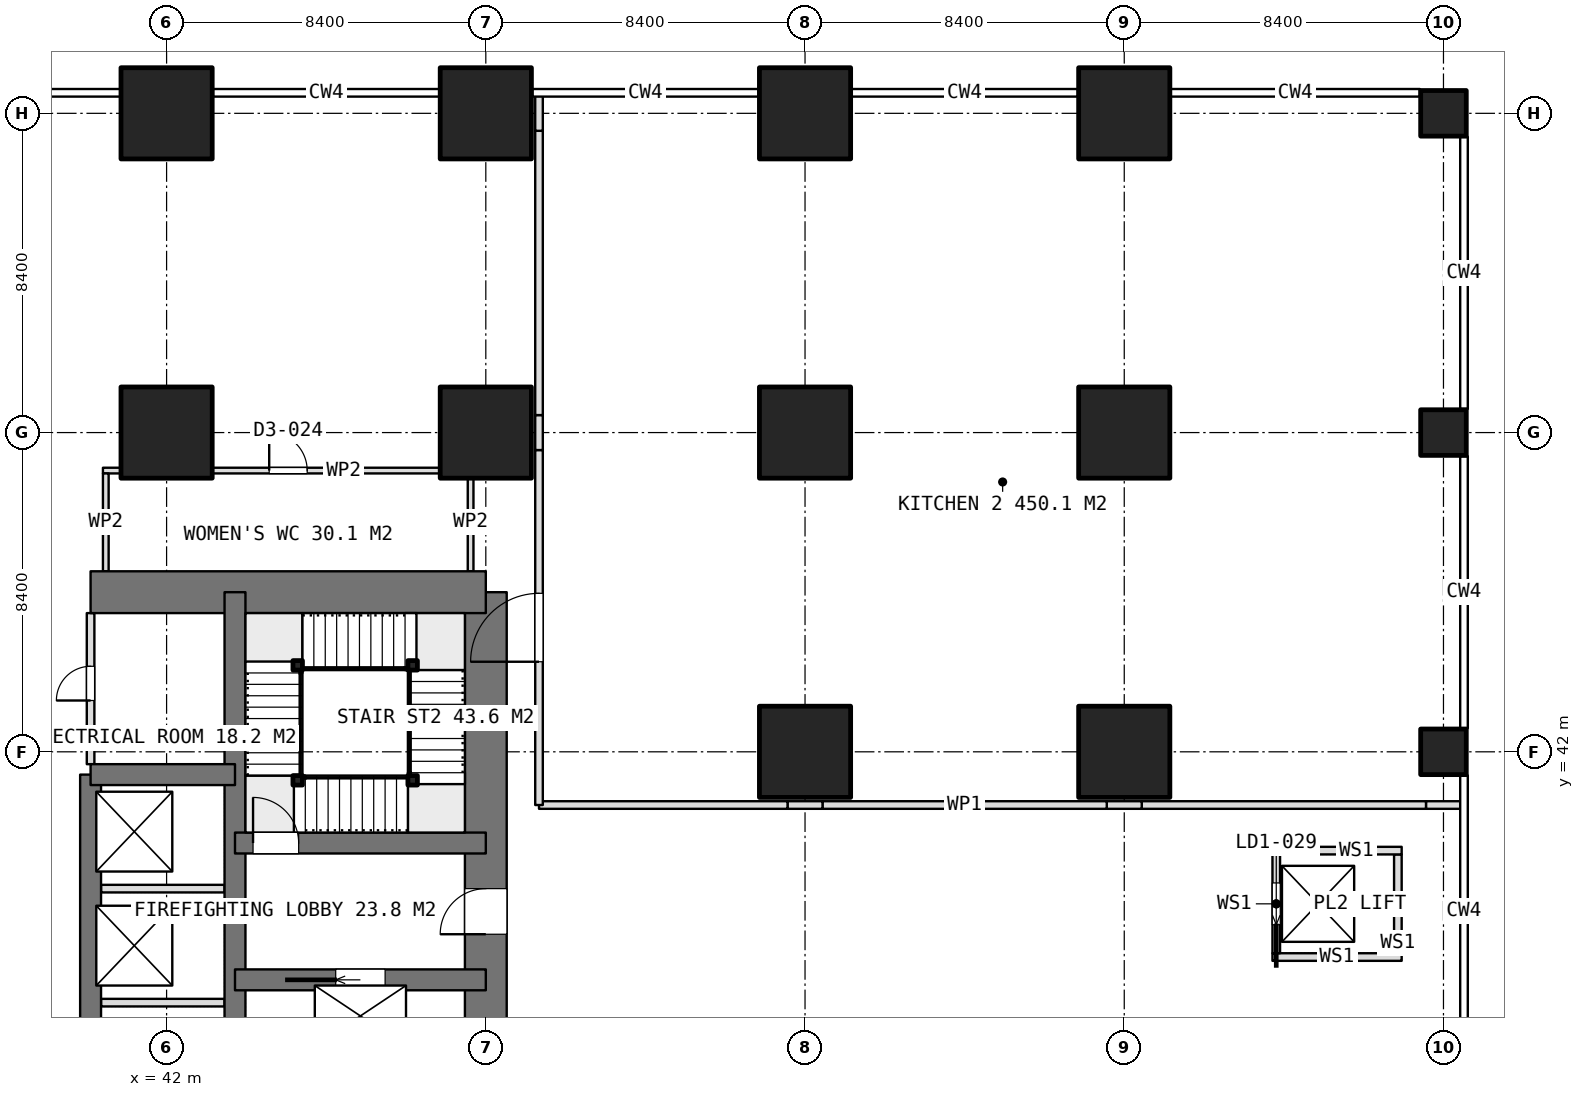
"""IFC4 building model, lengths in metres.
Left out: names, types, materials, properties, quantities, classifications, styles, units other than length and angle.
Written with IfcOpenShell. Run it as: python <this file> out.ifc"""

import sys

from ifc_helpers import new_model, si_unit, direction, frame, frame_2d, origin, origin_2d, place, context, subcontext, project, spatial, rectangle, extrude, element, fill, save


model = new_model("IFC4")
c1 = context("Model", 3, precision=1e-05, world=origin(), true_north=direction((0.0, 1.0)))
c2 = subcontext(c1, "Body", "Model", "MODEL_VIEW")
j1 = project(units=[si_unit("LENGTHUNIT", "METRE"), si_unit("PLANEANGLEUNIT", "RADIAN")], contexts=[c1])
p1 = place(None, origin())
s1 = spatial("IfcSite", under=j1, at=p1, CompositionType="ELEMENT")
p2 = place(p1, origin())
s2 = spatial("IfcBuilding", under=s1, at=p2, CompositionType="ELEMENT")
p3 = place(p2, frame((0.0, 0.0, 15.4)))
s3 = spatial("IfcBuildingStorey", under=s2, at=p3, CompositionType="ELEMENT", Elevation=15.4)
p4 = place(p3, frame((40.0, 46.2, 0.0), z_axis=(0.0, 0.0, 1.0), x_axis=(1.0, 0.0, 0.0)))
e1 = element("IfcWall", 1, at=p4, inside=s3, PredefinedType="SHEAR", context=c2, shape_type="SweptSolid", body=[
    extrude(rectangle(XDim=10.4, YDim=1.1, at=frame_2d((5.2, 0.0))), origin(), (0.0, 0.0, 1.0), 5.0),
])
p5 = place(p3, frame((50.4, 21.0, 0.0), z_axis=(0.0, 0.0, 1.0), x_axis=(0.0, 1.0, 0.0)))
e2 = element("IfcWall", 2, at=p5, inside=s3, PredefinedType="SHEAR", context=c2, shape_type="SweptSolid", body=[
    extrude(rectangle(XDim=25.2, YDim=1.1, at=frame_2d((12.6, 0.0))), origin(), (0.0, 0.0, 1.0), 5.0),
])
p6 = place(p5, frame((16.2, 0.0, 0.0)))
e3 = element("IfcOpeningElement", 3, at=p6, cuts=e2, PredefinedType="OPENING", context=c2, shape_type="SweptSolid", body=[
    extrude(rectangle(XDim=1.2, YDim=2.1, at=frame_2d((0.6, 1.05))), frame((0.0, 0.56, 0.0), z_axis=(0.0, -1.0, 0.0), x_axis=(1.0, 0.0, 0.0)), (0.0, 0.0, 1.0), 1.12),
])
p7 = place(p5, frame((10.05, 0.0, 0.0)))
e4 = element("IfcOpeningElement", 4, at=p7, cuts=e2, PredefinedType="OPENING", context=c2, shape_type="SweptSolid", body=[
    extrude(rectangle(XDim=0.9, YDim=2.1, at=frame_2d((0.45, 1.05))), frame((0.0, 0.56, 0.0), z_axis=(0.0, -1.0, 0.0), x_axis=(1.0, 0.0, 0.0)), (0.0, 0.0, 1.0), 1.12),
])
p8 = place(p5, frame((7.45, 0.0, 0.0)))
e5 = element("IfcOpeningElement", 5, at=p8, cuts=e2, PredefinedType="OPENING", context=c2, shape_type="SweptSolid", body=[
    extrude(rectangle(XDim=0.9, YDim=2.1, at=frame_2d((0.45, 1.05))), frame((0.0, 0.56, 0.0), z_axis=(0.0, -1.0, 0.0), x_axis=(1.0, 0.0, 0.0)), (0.0, 0.0, 1.0), 1.12),
])
p9 = place(p5, frame((0.75, 0.0, 0.0)))
e6 = element("IfcOpeningElement", 6, at=p9, cuts=e2, PredefinedType="OPENING", context=c2, shape_type="SweptSolid", body=[
    extrude(rectangle(XDim=1.2, YDim=2.1, at=frame_2d((0.6, 1.05))), frame((0.0, 0.56, 0.0), z_axis=(0.0, -1.0, 0.0), x_axis=(1.0, 0.0, 0.0)), (0.0, 0.0, 1.0), 1.12),
])
p10 = place(p3, frame((43.8, 21.0, 0.0), z_axis=(0.0, 0.0, 1.0), x_axis=(0.0, 1.0, 0.0)))
e7 = element("IfcWall", 7, at=p10, inside=s3, PredefinedType="SHEAR", context=c2, shape_type="SweptSolid", body=[
    extrude(rectangle(XDim=25.2, YDim=0.55, at=frame_2d((12.6, 0.0))), origin(), (0.0, 0.0, 1.0), 5.0),
])
p11 = place(p3, frame((40.0, 23.4, 0.0), z_axis=(0.0, 0.0, 1.0), x_axis=(0.0, 1.0, 0.0)))
e8 = element("IfcWall", 8, at=p11, inside=s3, PredefinedType="SHEAR", context=c2, shape_type="SweptSolid", body=[
    extrude(rectangle(XDim=18.0, YDim=0.55, at=frame_2d((9.0, 0.0))), origin(), (0.0, 0.0, 1.0), 5.0),
])
p12 = place(p3, frame((40.0, 41.4, 0.0), z_axis=(0.0, 0.0, 1.0), x_axis=(1.0, 0.0, 0.0)))
e9 = element("IfcWall", 9, at=p12, inside=s3, PredefinedType="SHEAR", context=c2, shape_type="SweptSolid", body=[
    extrude(rectangle(XDim=3.8, YDim=0.55, at=frame_2d((1.9, 0.0))), origin(), (0.0, 0.0, 1.0), 5.0),
])
p13 = place(p3, frame((43.8, 36.0, 0.0), z_axis=(0.0, 0.0, 1.0), x_axis=(1.0, 0.0, 0.0)))
e10 = element("IfcWall", 10, at=p13, inside=s3, PredefinedType="SHEAR", context=c2, shape_type="SweptSolid", body=[
    extrude(rectangle(XDim=6.6, YDim=0.55, at=frame_2d((3.3, 0.0))), origin(), (0.0, 0.0, 1.0), 5.0),
])
p14 = place(p13, frame((2.65, 0.0, 0.0)))
e11 = element("IfcOpeningElement", 11, at=p14, cuts=e10, PredefinedType="OPENING", context=c2, shape_type="SweptSolid", body=[
    extrude(rectangle(XDim=1.3, YDim=2.1, at=frame_2d((0.65, 1.05))), frame((0.0, 0.285, 0.0), z_axis=(0.0, -1.0, 0.0), x_axis=(1.0, 0.0, 0.0)), (0.0, 0.0, 1.0), 0.57),
])
p15 = place(p3, frame((43.8, 39.6, 0.0), z_axis=(0.0, 0.0, 1.0), x_axis=(1.0, 0.0, 0.0)))
e12 = element("IfcWall", 12, at=p15, inside=s3, PredefinedType="SHEAR", context=c2, shape_type="SweptSolid", body=[
    extrude(rectangle(XDim=6.6, YDim=0.55, at=frame_2d((3.3, 0.0))), origin(), (0.0, 0.0, 1.0), 5.0),
])
p16 = place(p15, frame((0.475, 0.0, 0.0)))
e13 = element("IfcOpeningElement", 13, at=p16, cuts=e12, PredefinedType="OPENING", context=c2, shape_type="SweptSolid", body=[
    extrude(rectangle(XDim=1.2, YDim=2.1, at=frame_2d((0.6, 1.05))), frame((0.0, 0.285, 0.0), z_axis=(0.0, -1.0, 0.0), x_axis=(1.0, 0.0, 0.0)), (0.0, 0.0, 1.0), 0.57),
])
for number, where, z_axis, x_axis in (
    (14, (42.0, 50.4, 0.0), (0.0, 0.0, 1.0), (1.0, 0.0, 0.0)),
    (15, (42.0, 58.8, 0.0), (0.0, 0.0, 1.0), (1.0, 0.0, 0.0)),
    (16, (50.4, 50.4, 0.0), (0.0, 0.0, 1.0), (1.0, 0.0, 0.0)),
    (17, (50.4, 58.8, 0.0), (0.0, 0.0, 1.0), (1.0, 0.0, 0.0)),
    (18, (58.8, 42.0, 0.0), (0.0, 0.0, 1.0), (1.0, 0.0, 0.0)),
    (19, (58.8, 50.4, 0.0), (0.0, 0.0, 1.0), (1.0, 0.0, 0.0)),
    (20, (58.8, 58.8, 0.0), (0.0, 0.0, 1.0), (1.0, 0.0, 0.0)),
    (21, (67.2, 42.0, 0.0), (0.0, 0.0, 1.0), (1.0, 0.0, 0.0)),
    (22, (67.2, 50.4, 0.0), (0.0, 0.0, 1.0), (1.0, 0.0, 0.0)),
    (23, (67.2, 58.8, 0.0), (0.0, 0.0, 1.0), (1.0, 0.0, 0.0)),
):
    element("IfcColumn", number, at=place(p3, frame(where, z_axis=z_axis, x_axis=x_axis)), inside=s3, PredefinedType="COLUMN", context=c2, shape_type="SweptSolid", body=[
        extrude(rectangle(XDim=2.4, YDim=2.4, at=origin_2d()), origin(), (0.0, 0.0, 1.0), 5.0),
    ])
for number, where, z_axis, x_axis in (
    (24, (75.6, 42.0, 0.0), (0.0, 0.0, 1.0), (1.0, 0.0, 0.0)),
    (25, (75.6, 50.4, 0.0), (0.0, 0.0, 1.0), (1.0, 0.0, 0.0)),
    (26, (75.6, 58.8, 0.0), (0.0, 0.0, 1.0), (1.0, 0.0, 0.0)),
):
    element("IfcColumn", number, at=place(p3, frame(where, z_axis=z_axis, x_axis=x_axis)), inside=s3, PredefinedType="COLUMN", context=c2, shape_type="SweptSolid", body=[
        extrude(rectangle(XDim=1.2, YDim=1.2, at=origin_2d()), origin(), (0.0, 0.0, 1.0), 5.0),
    ])
for number, where, z_axis, x_axis in (
    (27, (71.1, 36.6, 0.0), (0.0, 0.0, 1.0), (1.0, 0.0, 0.0)),
    (28, (71.1, 39.4, 0.0), (0.0, 0.0, 1.0), (1.0, 0.0, 0.0)),
):
    element("IfcWall", number, at=place(p3, frame(where, z_axis=z_axis, x_axis=x_axis)), inside=s3, PredefinedType="PARTITIONING", context=c2, shape_type="SweptSolid", body=[
        extrude(rectangle(XDim=3.4, YDim=0.2, at=frame_2d((1.7, 0.0))), origin(), (0.0, 0.0, 1.0), 2.9),
    ])
p17 = place(p3, frame((71.2, 36.7, 0.0), z_axis=(0.0, 0.0, 1.0), x_axis=(0.0, 1.0, 0.0)))
e29 = element("IfcWall", 29, at=p17, inside=s3, PredefinedType="PARTITIONING", context=c2, shape_type="SweptSolid", body=[
    extrude(rectangle(XDim=2.6, YDim=0.2, at=frame_2d((1.3, 0.0))), origin(), (0.0, 0.0, 1.0), 2.9),
])
p18 = place(p17, frame((0.75, 0.0, 0.0)))
e30 = element("IfcOpeningElement", 30, at=p18, cuts=e29, PredefinedType="OPENING", context=c2, shape_type="SweptSolid", body=[
    extrude(rectangle(XDim=1.1, YDim=2.1, at=frame_2d((0.55, 1.05))), frame((0.0, 0.11, 0.0), z_axis=(0.0, -1.0, 0.0), x_axis=(1.0, 0.0, 0.0)), (0.0, 0.0, 1.0), 0.22),
])
p19 = place(p3, frame((74.4, 36.7, 0.0), z_axis=(0.0, 0.0, 1.0), x_axis=(0.0, 1.0, 0.0)))
e31 = element("IfcWall", 31, at=p19, inside=s3, PredefinedType="PARTITIONING", context=c2, shape_type="SweptSolid", body=[
    extrude(rectangle(XDim=2.6, YDim=0.2, at=frame_2d((1.3, 0.0))), origin(), (0.0, 0.0, 1.0), 2.9),
])
for number, where, z_axis, x_axis in (
    (32, (40.275, 35.4, 0.0), (0.0, 0.0, 1.0), (1.0, 0.0, 0.0)),
    (33, (40.275, 38.4, 0.0), (0.0, 0.0, 1.0), (1.0, 0.0, 0.0)),
):
    element("IfcWall", number, at=place(p3, frame(where, z_axis=z_axis, x_axis=x_axis)), inside=s3, PredefinedType="PARTITIONING", context=c2, shape_type="SweptSolid", body=[
        extrude(rectangle(XDim=3.25, YDim=0.2, at=frame_2d((1.625, 0.0))), origin(), (0.0, 0.0, 1.0), 4.7),
    ])
p20 = place(p3, frame((40.0, 41.675, 0.0), z_axis=(0.0, 0.0, 1.0), x_axis=(0.0, 1.0, 0.0)))
e34 = element("IfcWall", 34, at=p20, inside=s3, PredefinedType="PARTITIONING", context=c2, shape_type="SweptSolid", body=[
    extrude(rectangle(XDim=3.975, YDim=0.2, at=frame_2d((1.987, 0.0))), origin(), (0.0, 0.0, 1.0), 4.7),
])
p21 = place(p20, frame((1.675, 0.0, 0.0)))
e35 = element("IfcOpeningElement", 35, at=p21, cuts=e34, PredefinedType="OPENING", context=c2, shape_type="SweptSolid", body=[
    extrude(rectangle(XDim=0.9, YDim=2.1, at=frame_2d((0.45, 1.05))), frame((0.0, 0.11, 0.0), z_axis=(0.0, -1.0, 0.0), x_axis=(1.0, 0.0, 0.0)), (0.0, 0.0, 1.0), 0.22),
])
p22 = place(p3, frame((40.325, 49.4, 0.0), z_axis=(0.0, 0.0, 1.0), x_axis=(1.0, 0.0, 0.0)))
e36 = element("IfcWall", 36, at=p22, inside=s3, PredefinedType="PARTITIONING", context=c2, shape_type="SweptSolid", body=[
    extrude(rectangle(XDim=9.75, YDim=0.15, at=frame_2d((4.875, 0.0))), origin(), (0.0, 0.0, 1.0), 4.7),
])
p23 = place(p22, frame((4.375, 0.0, 0.0)))
e37 = element("IfcOpeningElement", 37, at=p23, cuts=e36, PredefinedType="OPENING", context=c2, shape_type="SweptSolid", body=[
    extrude(rectangle(XDim=1.0, YDim=2.1, at=frame_2d((0.5, 1.05))), frame((0.0, 0.085, 0.0), z_axis=(0.0, -1.0, 0.0), x_axis=(1.0, 0.0, 0.0)), (0.0, 0.0, 1.0), 0.17),
])
for number, where, z_axis, x_axis in (
    (38, (40.4, 46.75, 0.0), (0.0, 0.0, 1.0), (0.0, 1.0, 0.0)),
    (39, (50.0, 46.75, 0.0), (0.0, 0.0, 1.0), (0.0, 1.0, 0.0)),
):
    element("IfcWall", number, at=place(p3, frame(where, z_axis=z_axis, x_axis=x_axis)), inside=s3, PredefinedType="PARTITIONING", context=c2, shape_type="SweptSolid", body=[
        extrude(rectangle(XDim=2.575, YDim=0.15, at=frame_2d((1.288, 0.0))), origin(), (0.0, 0.0, 1.0), 4.7),
    ])
p24 = place(p3, frame((76.09, 40.6, 0.0), z_axis=(0.0, 0.0, 1.0), x_axis=(-1.0, 0.0, 0.0)))
e40 = element("IfcWall", 40, at=p24, inside=s3, PredefinedType="PARTITIONING", context=c2, shape_type="SweptSolid", body=[
    extrude(rectangle(XDim=0.95, YDim=0.2, at=frame_2d((0.475, 0.0))), origin(), (0.0, 0.0, 1.0), 2.9),
])
p25 = place(p3, frame((75.14, 40.6, 0.0), z_axis=(0.0, 0.0, 1.0), x_axis=(-1.0, 0.0, 0.0)))
e41 = element("IfcWall", 41, at=p25, inside=s3, PredefinedType="PARTITIONING", context=c2, shape_type="SweptSolid", body=[
    extrude(rectangle(XDim=7.48, YDim=0.2, at=frame_2d((3.74, 0.0))), origin(), (0.0, 0.0, 1.0), 4.7),
])
p26 = place(p3, frame((67.66, 40.6, 0.0), z_axis=(0.0, 0.0, 1.0), x_axis=(-1.0, 0.0, 0.0)))
e42 = element("IfcWall", 42, at=p26, inside=s3, PredefinedType="PARTITIONING", context=c2, shape_type="SweptSolid", body=[
    extrude(rectangle(XDim=0.92, YDim=0.2, at=frame_2d((0.46, 0.0))), origin(), (0.0, 0.0, 1.0), 2.9),
])
p27 = place(p3, frame((66.74, 40.6, 0.0), z_axis=(0.0, 0.0, 1.0), x_axis=(-1.0, 0.0, 0.0)))
e43 = element("IfcWall", 43, at=p27, inside=s3, PredefinedType="PARTITIONING", context=c2, shape_type="SweptSolid", body=[
    extrude(rectangle(XDim=7.48, YDim=0.2, at=frame_2d((3.74, 0.0))), origin(), (0.0, 0.0, 1.0), 4.7),
])
p28 = place(p3, frame((59.26, 40.6, 0.0), z_axis=(0.0, 0.0, 1.0), x_axis=(-1.0, 0.0, 0.0)))
e44 = element("IfcWall", 44, at=p28, inside=s3, PredefinedType="PARTITIONING", context=c2, shape_type="SweptSolid", body=[
    extrude(rectangle(XDim=0.92, YDim=0.2, at=frame_2d((0.46, 0.0))), origin(), (0.0, 0.0, 1.0), 2.9),
])
p29 = place(p3, frame((58.34, 40.6, 0.0), z_axis=(0.0, 0.0, 1.0), x_axis=(-1.0, 0.0, 0.0)))
e45 = element("IfcWall", 45, at=p29, inside=s3, PredefinedType="PARTITIONING", context=c2, shape_type="SweptSolid", body=[
    extrude(rectangle(XDim=6.54, YDim=0.2, at=frame_2d((3.27, 0.0))), origin(), (0.0, 0.0, 1.0), 4.7),
])
p30 = place(p3, frame((51.8, 40.6, 0.0), z_axis=(0.0, 0.0, 1.0), x_axis=(0.0, 1.0, 0.0)))
e46 = element("IfcWall", 46, at=p30, inside=s3, PredefinedType="PARTITIONING", context=c2, shape_type="SweptSolid", body=[
    extrude(rectangle(XDim=9.34, YDim=0.2, at=frame_2d((4.67, 0.0))), origin(), (0.0, 0.0, 1.0), 4.7),
])
p31 = place(p30, frame((3.77, 0.0, 0.0)))
e47 = element("IfcOpeningElement", 47, at=p31, cuts=e46, PredefinedType="OPENING", context=c2, shape_type="SweptSolid", body=[
    extrude(rectangle(XDim=1.8, YDim=2.1, at=frame_2d((0.9, 1.05))), frame((0.0, 0.11, 0.0), z_axis=(0.0, -1.0, 0.0), x_axis=(1.0, 0.0, 0.0)), (0.0, 0.0, 1.0), 0.22),
])
p32 = place(p3, frame((51.8, 49.94, 0.0), z_axis=(0.0, 0.0, 1.0), x_axis=(0.0, 1.0, 0.0)))
e48 = element("IfcWall", 48, at=p32, inside=s3, PredefinedType="PARTITIONING", context=c2, shape_type="SweptSolid", body=[
    extrude(rectangle(XDim=0.92, YDim=0.2, at=frame_2d((0.46, 0.0))), origin(), (0.0, 0.0, 1.0), 2.9),
])
p33 = place(p3, frame((51.8, 50.86, 0.0), z_axis=(0.0, 0.0, 1.0), x_axis=(0.0, 1.0, 0.0)))
e49 = element("IfcWall", 49, at=p33, inside=s3, PredefinedType="PARTITIONING", context=c2, shape_type="SweptSolid", body=[
    extrude(rectangle(XDim=7.48, YDim=0.2, at=frame_2d((3.74, 0.0))), origin(), (0.0, 0.0, 1.0), 4.7),
])
p34 = place(p3, frame((51.8, 58.34, 0.0), z_axis=(0.0, 0.0, 1.0), x_axis=(0.0, 1.0, 0.0)))
e50 = element("IfcWall", 50, at=p34, inside=s3, PredefinedType="PARTITIONING", context=c2, shape_type="SweptSolid", body=[
    extrude(rectangle(XDim=0.95, YDim=0.2, at=frame_2d((0.475, 0.0))), origin(), (0.0, 0.0, 1.0), 2.9),
])
for number, where, z_axis, x_axis in (
    (51, (45.45, 41.25, 0.0), (0.0, 0.0, 1.0), (1.0, 0.0, 0.0)),
    (52, (45.45, 44.275, 0.0), (0.0, 0.0, 1.0), (1.0, 0.0, 0.0)),
    (53, (48.475, 44.275, 0.0), (0.0, 0.0, 1.0), (1.0, 0.0, 0.0)),
    (54, (48.475, 41.25, 0.0), (0.0, 0.0, 1.0), (1.0, 0.0, 0.0)),
):
    element("IfcColumn", number, at=place(p3, frame(where, z_axis=z_axis, x_axis=x_axis)), inside=s3, PredefinedType="COLUMN", context=c2, shape_type="SweptSolid", body=[
        extrude(rectangle(XDim=0.25, YDim=0.25, at=origin_2d()), origin(), (0.0, 0.0, 1.0), 5.0),
    ])
p35 = place(p6, origin())
e55 = element("IfcDoor", 55, at=p35, inside=s3, OperationType="SINGLE_SWING_LEFT", PredefinedType="DOOR", context=c2, shape_type="SweptSolid", body=[
    extrude(rectangle(XDim=1.2, YDim=2.1, at=frame_2d((0.6, 1.05))), frame((0.0, 0.025, 0.0), z_axis=(0.0, -1.0, 0.0), x_axis=(1.0, 0.0, 0.0)), (0.0, 0.0, 1.0), 0.05),
])
fill(e3, e55)
p36 = place(p21, origin())
e56 = element("IfcDoor", 56, at=p36, inside=s3, OperationType="SINGLE_SWING_LEFT", PredefinedType="DOOR", context=c2, shape_type="SweptSolid", body=[
    extrude(rectangle(XDim=0.9, YDim=2.1, at=frame_2d((0.45, 1.05))), frame((0.0, 0.025, 0.0), z_axis=(0.0, -1.0, 0.0), x_axis=(1.0, 0.0, 0.0)), (0.0, 0.0, 1.0), 0.05),
])
fill(e35, e56)
p37 = place(p14, origin())
e57 = element("IfcDoor", 57, at=p37, inside=s3, OperationType="SLIDING_TO_LEFT", PredefinedType="USERDEFINED", context=c2, shape_type="SweptSolid", body=[
    extrude(rectangle(XDim=1.3, YDim=2.1, at=frame_2d((0.65, 1.05))), frame((0.0, 0.025, 0.0), z_axis=(0.0, -1.0, 0.0), x_axis=(1.0, 0.0, 0.0)), (0.0, 0.0, 1.0), 0.05),
])
fill(e11, e57)
p38 = place(p18, origin())
e58 = element("IfcDoor", 58, at=p38, inside=s3, OperationType="SLIDING_TO_LEFT", PredefinedType="USERDEFINED", context=c2, shape_type="SweptSolid", body=[
    extrude(rectangle(XDim=1.1, YDim=2.1, at=frame_2d((0.55, 1.05))), frame((0.0, 0.025, 0.0), z_axis=(0.0, -1.0, 0.0), x_axis=(1.0, 0.0, 0.0)), (0.0, 0.0, 1.0), 0.05),
])
fill(e30, e58)
p39 = place(p23, origin())
e59 = element("IfcDoor", 59, at=p39, inside=s3, OperationType="SINGLE_SWING_LEFT", PredefinedType="DOOR", context=c2, shape_type="SweptSolid", body=[
    extrude(rectangle(XDim=1.0, YDim=2.1, at=frame_2d((0.5, 1.05))), frame((0.0, 0.025, 0.0), z_axis=(0.0, -1.0, 0.0), x_axis=(1.0, 0.0, 0.0)), (0.0, 0.0, 1.0), 0.05),
])
fill(e37, e59)
p40 = place(p31, origin())
e60 = element("IfcDoor", 60, at=p40, inside=s3, OperationType="DOUBLE_DOOR_SINGLE_SWING", PredefinedType="DOOR", context=c2, shape_type="SweptSolid", body=[
    extrude(rectangle(XDim=1.8, YDim=2.1, at=frame_2d((0.9, 1.05))), frame((0.0, 0.025, 0.0), z_axis=(0.0, -1.0, 0.0), x_axis=(1.0, 0.0, 0.0)), (0.0, 0.0, 1.0), 0.05),
])
fill(e47, e60)
p41 = place(p16, origin())
e61 = element("IfcDoor", 61, at=p41, inside=s3, OperationType="SINGLE_SWING_RIGHT", PredefinedType="DOOR", context=c2, shape_type="SweptSolid", body=[
    extrude(rectangle(XDim=1.2, YDim=2.1, at=frame_2d((0.6, 1.05))), frame((0.0, 0.025, 0.0), z_axis=(0.0, -1.0, 0.0), x_axis=(1.0, 0.0, 0.0)), (0.0, 0.0, 1.0), 0.05),
])
fill(e13, e61)
save(model, sys.argv[1])
